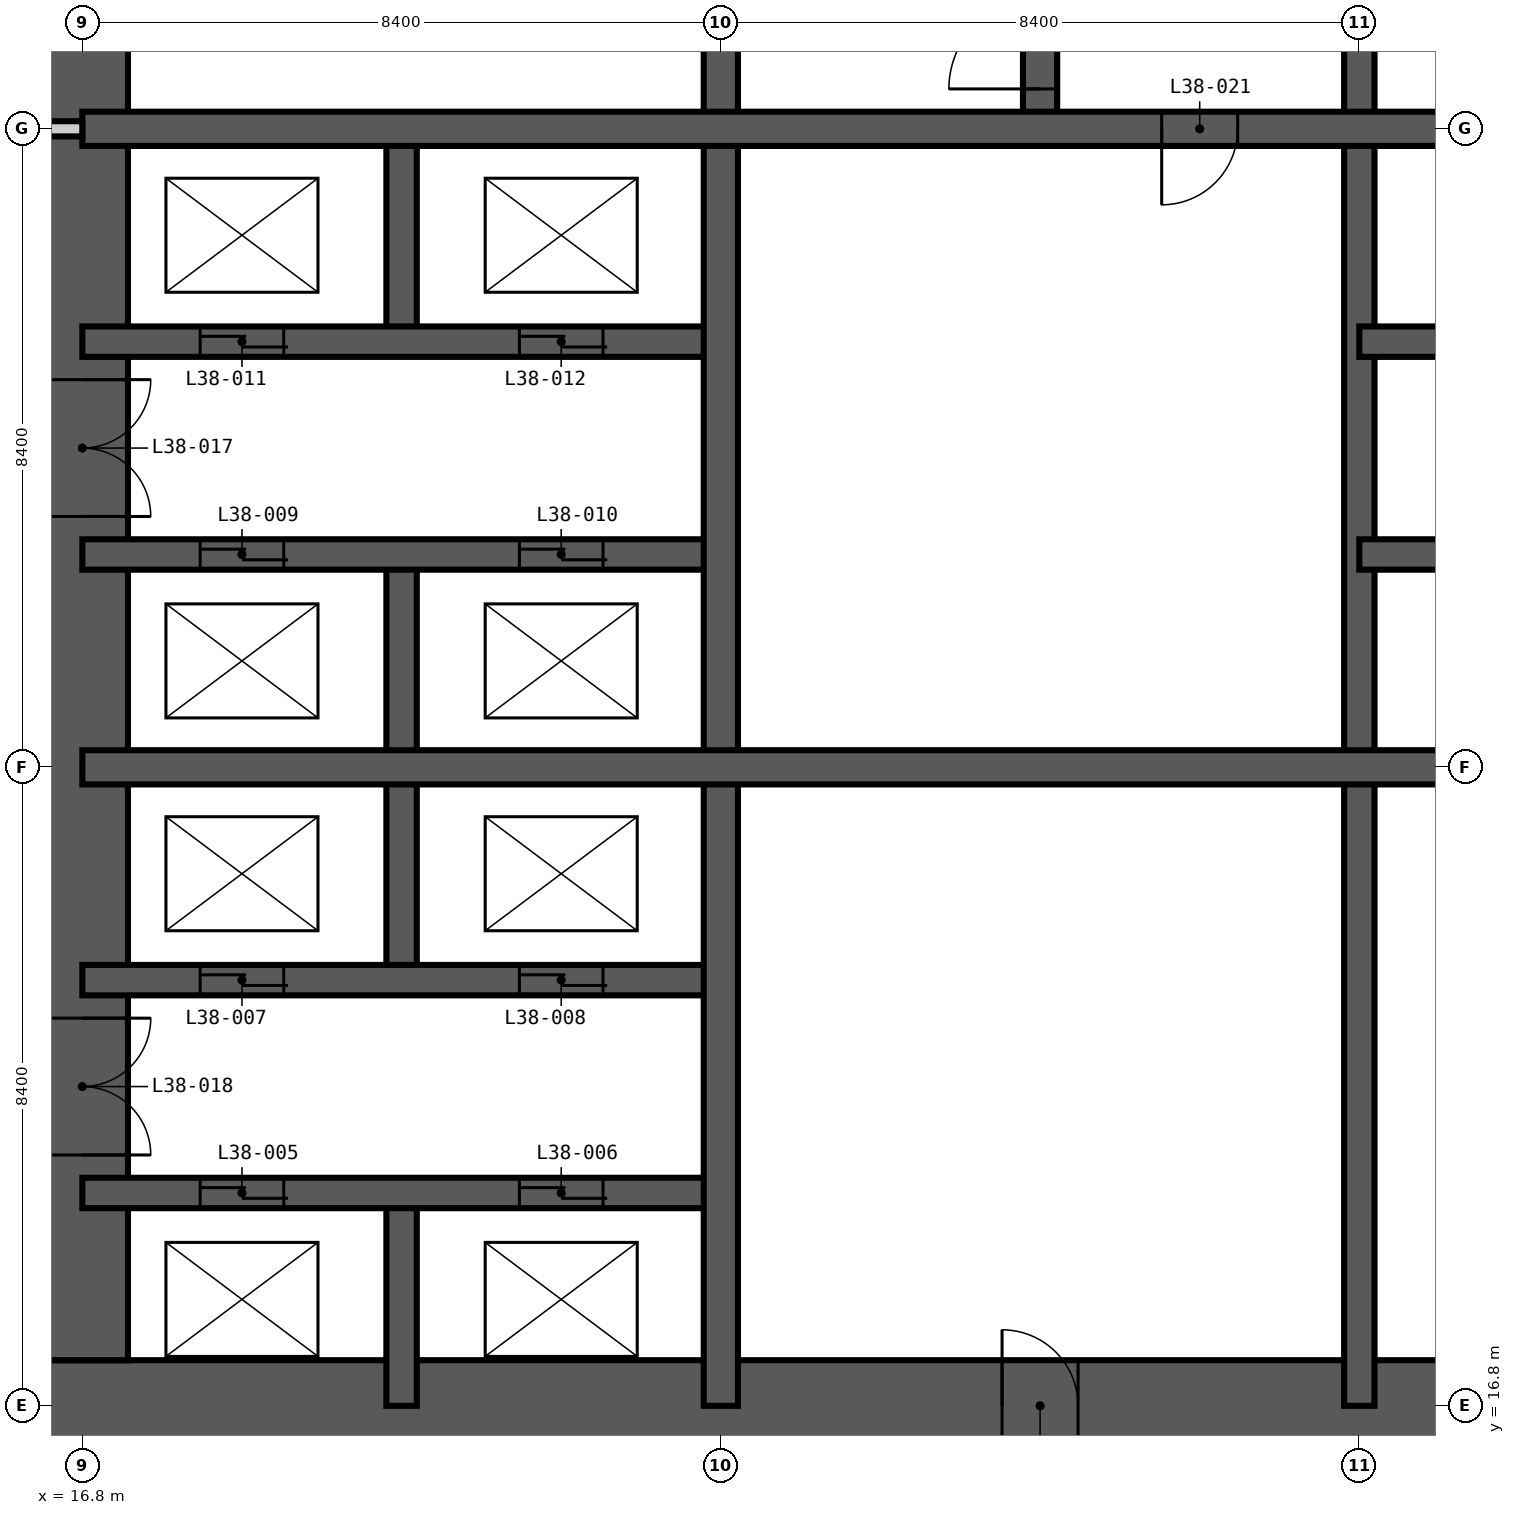
"""IFC4 building model, lengths in metres.
Left out: names, types, materials, properties, quantities, classifications, styles, units other than length and angle.
Written with IfcOpenShell. Run it as: python <this file> out.ifc"""

import sys

from ifc_helpers import new_model, si_unit, direction, frame, frame_2d, origin, place, context, subcontext, project, spatial, rectangle, extrude, element, fill, save


model = new_model("IFC4")
c1 = context("Model", 3, precision=1e-05, world=origin(), true_north=direction((0.0, 1.0)))
c2 = subcontext(c1, "Body", "Model", "MODEL_VIEW")
j1 = project(units=[si_unit("LENGTHUNIT", "METRE"), si_unit("PLANEANGLEUNIT", "RADIAN")], contexts=[c1])
p1 = place(None, origin())
s1 = spatial("IfcSite", under=j1, at=p1, CompositionType="ELEMENT")
p2 = place(p1, origin())
s2 = spatial("IfcBuilding", under=s1, at=p2, CompositionType="ELEMENT")
p3 = place(p2, frame((0.0, 0.0, 147.6)))
s3 = spatial("IfcBuildingStorey", under=s2, at=p3, CompositionType="ELEMENT", Elevation=147.6)
p4 = place(p3, frame((16.2, 16.8, -0.35), z_axis=(0.0, 0.0, 1.0), x_axis=(1.0, 0.0, 0.0)))
e1 = element("IfcWall", 1, at=p4, inside=s3, PredefinedType="SHEAR", context=c2, shape_type="SweptSolid", body=[
    extrude(rectangle(XDim=26.4, YDim=1.2, at=frame_2d((13.2, 0.0))), origin(), (0.0, 0.0, 1.0), 5.95),
])
p5 = place(p4, frame((12.7, 0.0, 0.35)))
e2 = element("IfcOpeningElement", 2, at=p5, cuts=e1, PredefinedType="OPENING", context=c2, shape_type="SweptSolid", body=[
    extrude(rectangle(XDim=1.0, YDim=2.1, at=frame_2d((0.5, 1.05))), frame((0.0, 0.61, 0.0), z_axis=(0.0, -1.0, 0.0), x_axis=(1.0, 0.0, 0.0)), (0.0, 0.0, 1.0), 1.22),
])
p6 = place(p4, frame((19.0, 0.0, 0.35)))
e3 = element("IfcOpeningElement", 3, at=p6, cuts=e1, PredefinedType="OPENING", context=c2, shape_type="SweptSolid", body=[
    extrude(rectangle(XDim=1.0, YDim=2.1, at=frame_2d((0.5, 1.05))), frame((0.0, 0.61, 0.0), z_axis=(0.0, -1.0, 0.0), x_axis=(1.0, 0.0, 0.0)), (0.0, 0.0, 1.0), 1.22),
])
p7 = place(p3, frame((16.8, 41.4, -0.35), z_axis=(0.0, 0.0, 1.0), x_axis=(0.0, -1.0, 0.0)))
e4 = element("IfcWall", 4, at=p7, inside=s3, PredefinedType="SHEAR", context=c2, shape_type="SweptSolid", body=[
    extrude(rectangle(XDim=24.0, YDim=1.2, at=frame_2d((12.0, 0.0))), origin(), (0.0, 0.0, 1.0), 5.95),
])
p8 = place(p7, frame((11.1, 0.0, 0.35)))
e5 = element("IfcOpeningElement", 5, at=p8, cuts=e4, PredefinedType="OPENING", context=c2, shape_type="SweptSolid", body=[
    extrude(rectangle(XDim=1.8, YDim=2.2, at=frame_2d((0.9, 1.1))), frame((0.0, 0.61, 0.0), z_axis=(0.0, -1.0, 0.0), x_axis=(1.0, 0.0, 0.0)), (0.0, 0.0, 1.0), 1.22),
])
p9 = place(p7, frame((19.5, 0.0, 0.35)))
e6 = element("IfcOpeningElement", 6, at=p9, cuts=e4, PredefinedType="OPENING", context=c2, shape_type="SweptSolid", body=[
    extrude(rectangle(XDim=1.8, YDim=2.2, at=frame_2d((0.9, 1.1))), frame((0.0, 0.61, 0.0), z_axis=(0.0, -1.0, 0.0), x_axis=(1.0, 0.0, 0.0)), (0.0, 0.0, 1.0), 1.22),
])
p10 = place(p7, frame((5.2, 0.0, 0.35)))
e7 = element("IfcOpeningElement", 7, at=p10, cuts=e4, PredefinedType="OPENING", context=c2, shape_type="SweptSolid", body=[
    extrude(rectangle(XDim=1.0, YDim=2.1, at=frame_2d((0.5, 1.05))), frame((0.0, 0.61, 0.0), z_axis=(0.0, -1.0, 0.0), x_axis=(1.0, 0.0, 0.0)), (0.0, 0.0, 1.0), 1.22),
])
p11 = place(p3, frame((21.0, 16.8, -0.35), z_axis=(0.0, 0.0, 1.0), x_axis=(0.0, 1.0, 0.0)))
e8 = element("IfcWall", 8, at=p11, inside=s3, PredefinedType="SHEAR", context=c2, shape_type="SweptSolid", body=[
    extrude(rectangle(XDim=2.8, YDim=0.4, at=frame_2d((1.4, 0.0))), origin(), (0.0, 0.0, 1.0), 5.95),
])
p12 = place(p3, frame((21.0, 22.4, -0.35), z_axis=(0.0, 0.0, 1.0), x_axis=(0.0, 1.0, 0.0)))
e9 = element("IfcWall", 9, at=p12, inside=s3, PredefinedType="SHEAR", context=c2, shape_type="SweptSolid", body=[
    extrude(rectangle(XDim=5.6, YDim=0.4, at=frame_2d((2.8, 0.0))), origin(), (0.0, 0.0, 1.0), 5.95),
])
p13 = place(p3, frame((21.0, 30.8, -0.35), z_axis=(0.0, 0.0, 1.0), x_axis=(0.0, 1.0, 0.0)))
e10 = element("IfcWall", 10, at=p13, inside=s3, PredefinedType="SHEAR", context=c2, shape_type="SweptSolid", body=[
    extrude(rectangle(XDim=2.8, YDim=0.4, at=frame_2d((1.4, 0.0))), origin(), (0.0, 0.0, 1.0), 5.95),
])
p14 = place(p3, frame((33.6, 16.8, -0.35), z_axis=(0.0, 0.0, 1.0), x_axis=(0.0, 1.0, 0.0)))
e11 = element("IfcWall", 11, at=p14, inside=s3, PredefinedType="SHEAR", context=c2, shape_type="SweptSolid", body=[
    extrude(rectangle(XDim=25.2, YDim=0.4, at=frame_2d((12.6, 0.0))), origin(), (0.0, 0.0, 1.0), 5.95),
])
p15 = place(p14, frame((22.5, 0.0, 0.35)))
e12 = element("IfcOpeningElement", 12, at=p15, cuts=e11, PredefinedType="OPENING", context=c2, shape_type="SweptSolid", body=[
    extrude(rectangle(XDim=1.2, YDim=2.2, at=frame_2d((0.6, 1.1))), frame((0.0, 0.21, 0.0), z_axis=(0.0, -1.0, 0.0), x_axis=(1.0, 0.0, 0.0)), (0.0, 0.0, 1.0), 0.42),
])
p16 = place(p14, frame((18.3, 0.0, 0.35)))
e13 = element("IfcOpeningElement", 13, at=p16, cuts=e11, PredefinedType="OPENING", context=c2, shape_type="SweptSolid", body=[
    extrude(rectangle(XDim=1.2, YDim=2.2, at=frame_2d((0.6, 1.1))), frame((0.0, 0.21, 0.0), z_axis=(0.0, -1.0, 0.0), x_axis=(1.0, 0.0, 0.0)), (0.0, 0.0, 1.0), 0.42),
])
p17 = place(p3, frame((16.8, 19.6, -0.35), z_axis=(0.0, 0.0, 1.0), x_axis=(1.0, 0.0, 0.0)))
e14 = element("IfcWall", 14, at=p17, inside=s3, PredefinedType="SHEAR", context=c2, shape_type="SweptSolid", body=[
    extrude(rectangle(XDim=8.4, YDim=0.4, at=frame_2d((4.2, 0.0))), origin(), (0.0, 0.0, 1.0), 5.95),
])
p18 = place(p17, frame((1.55, 0.0, 0.35)))
e15 = element("IfcOpeningElement", 15, at=p18, cuts=e14, PredefinedType="OPENING", context=c2, shape_type="SweptSolid", body=[
    extrude(rectangle(XDim=1.1, YDim=2.2, at=frame_2d((0.55, 1.1))), frame((0.0, 0.21, 0.0), z_axis=(0.0, -1.0, 0.0), x_axis=(1.0, 0.0, 0.0)), (0.0, 0.0, 1.0), 0.42),
])
p19 = place(p17, frame((5.75, 0.0, 0.35)))
e16 = element("IfcOpeningElement", 16, at=p19, cuts=e14, PredefinedType="OPENING", context=c2, shape_type="SweptSolid", body=[
    extrude(rectangle(XDim=1.1, YDim=2.2, at=frame_2d((0.55, 1.1))), frame((0.0, 0.21, 0.0), z_axis=(0.0, -1.0, 0.0), x_axis=(1.0, 0.0, 0.0)), (0.0, 0.0, 1.0), 0.42),
])
p20 = place(p3, frame((16.8, 22.4, -0.35), z_axis=(0.0, 0.0, 1.0), x_axis=(1.0, 0.0, 0.0)))
e17 = element("IfcWall", 17, at=p20, inside=s3, PredefinedType="SHEAR", context=c2, shape_type="SweptSolid", body=[
    extrude(rectangle(XDim=8.4, YDim=0.4, at=frame_2d((4.2, 0.0))), origin(), (0.0, 0.0, 1.0), 5.95),
])
p21 = place(p20, frame((1.55, 0.0, 0.35)))
e18 = element("IfcOpeningElement", 18, at=p21, cuts=e17, PredefinedType="OPENING", context=c2, shape_type="SweptSolid", body=[
    extrude(rectangle(XDim=1.1, YDim=2.2, at=frame_2d((0.55, 1.1))), frame((0.0, 0.21, 0.0), z_axis=(0.0, -1.0, 0.0), x_axis=(1.0, 0.0, 0.0)), (0.0, 0.0, 1.0), 0.42),
])
p22 = place(p20, frame((5.75, 0.0, 0.35)))
e19 = element("IfcOpeningElement", 19, at=p22, cuts=e17, PredefinedType="OPENING", context=c2, shape_type="SweptSolid", body=[
    extrude(rectangle(XDim=1.1, YDim=2.2, at=frame_2d((0.55, 1.1))), frame((0.0, 0.21, 0.0), z_axis=(0.0, -1.0, 0.0), x_axis=(1.0, 0.0, 0.0)), (0.0, 0.0, 1.0), 0.42),
])
p23 = place(p3, frame((16.8, 28.0, -0.35), z_axis=(0.0, 0.0, 1.0), x_axis=(1.0, 0.0, 0.0)))
e20 = element("IfcWall", 20, at=p23, inside=s3, PredefinedType="SHEAR", context=c2, shape_type="SweptSolid", body=[
    extrude(rectangle(XDim=8.4, YDim=0.4, at=frame_2d((4.2, 0.0))), origin(), (0.0, 0.0, 1.0), 5.95),
])
p24 = place(p23, frame((1.55, 0.0, 0.35)))
e21 = element("IfcOpeningElement", 21, at=p24, cuts=e20, PredefinedType="OPENING", context=c2, shape_type="SweptSolid", body=[
    extrude(rectangle(XDim=1.1, YDim=2.2, at=frame_2d((0.55, 1.1))), frame((0.0, 0.21, 0.0), z_axis=(0.0, -1.0, 0.0), x_axis=(1.0, 0.0, 0.0)), (0.0, 0.0, 1.0), 0.42),
])
p25 = place(p23, frame((5.75, 0.0, 0.35)))
e22 = element("IfcOpeningElement", 22, at=p25, cuts=e20, PredefinedType="OPENING", context=c2, shape_type="SweptSolid", body=[
    extrude(rectangle(XDim=1.1, YDim=2.2, at=frame_2d((0.55, 1.1))), frame((0.0, 0.21, 0.0), z_axis=(0.0, -1.0, 0.0), x_axis=(1.0, 0.0, 0.0)), (0.0, 0.0, 1.0), 0.42),
])
p26 = place(p3, frame((33.6, 28.0, -0.35), z_axis=(0.0, 0.0, 1.0), x_axis=(1.0, 0.0, 0.0)))
e23 = element("IfcWall", 23, at=p26, inside=s3, PredefinedType="SHEAR", context=c2, shape_type="SweptSolid", body=[
    extrude(rectangle(XDim=8.4, YDim=0.4, at=frame_2d((4.2, 0.0))), origin(), (0.0, 0.0, 1.0), 5.95),
])
p27 = place(p26, frame((1.55, 0.0, 0.35)))
e24 = element("IfcOpeningElement", 24, at=p27, cuts=e23, PredefinedType="OPENING", context=c2, shape_type="SweptSolid", body=[
    extrude(rectangle(XDim=1.1, YDim=2.2, at=frame_2d((0.55, 1.1))), frame((0.0, 0.21, 0.0), z_axis=(0.0, -1.0, 0.0), x_axis=(1.0, 0.0, 0.0)), (0.0, 0.0, 1.0), 0.42),
])
p28 = place(p26, frame((5.75, 0.0, 0.35)))
e25 = element("IfcOpeningElement", 25, at=p28, cuts=e23, PredefinedType="OPENING", context=c2, shape_type="SweptSolid", body=[
    extrude(rectangle(XDim=1.1, YDim=2.2, at=frame_2d((0.55, 1.1))), frame((0.0, 0.21, 0.0), z_axis=(0.0, -1.0, 0.0), x_axis=(1.0, 0.0, 0.0)), (0.0, 0.0, 1.0), 0.42),
])
p29 = place(p3, frame((16.8, 30.8, -0.35), z_axis=(0.0, 0.0, 1.0), x_axis=(1.0, 0.0, 0.0)))
e26 = element("IfcWall", 26, at=p29, inside=s3, PredefinedType="SHEAR", context=c2, shape_type="SweptSolid", body=[
    extrude(rectangle(XDim=8.4, YDim=0.4, at=frame_2d((4.2, 0.0))), origin(), (0.0, 0.0, 1.0), 5.95),
])
p30 = place(p29, frame((1.55, 0.0, 0.35)))
e27 = element("IfcOpeningElement", 27, at=p30, cuts=e26, PredefinedType="OPENING", context=c2, shape_type="SweptSolid", body=[
    extrude(rectangle(XDim=1.1, YDim=2.2, at=frame_2d((0.55, 1.1))), frame((0.0, 0.21, 0.0), z_axis=(0.0, -1.0, 0.0), x_axis=(1.0, 0.0, 0.0)), (0.0, 0.0, 1.0), 0.42),
])
p31 = place(p29, frame((5.75, 0.0, 0.35)))
e28 = element("IfcOpeningElement", 28, at=p31, cuts=e26, PredefinedType="OPENING", context=c2, shape_type="SweptSolid", body=[
    extrude(rectangle(XDim=1.1, YDim=2.2, at=frame_2d((0.55, 1.1))), frame((0.0, 0.21, 0.0), z_axis=(0.0, -1.0, 0.0), x_axis=(1.0, 0.0, 0.0)), (0.0, 0.0, 1.0), 0.42),
])
p32 = place(p3, frame((33.6, 30.8, -0.35), z_axis=(0.0, 0.0, 1.0), x_axis=(1.0, 0.0, 0.0)))
e29 = element("IfcWall", 29, at=p32, inside=s3, PredefinedType="SHEAR", context=c2, shape_type="SweptSolid", body=[
    extrude(rectangle(XDim=8.4, YDim=0.4, at=frame_2d((4.2, 0.0))), origin(), (0.0, 0.0, 1.0), 5.95),
])
p33 = place(p32, frame((1.55, 0.0, 0.35)))
e30 = element("IfcOpeningElement", 30, at=p33, cuts=e29, PredefinedType="OPENING", context=c2, shape_type="SweptSolid", body=[
    extrude(rectangle(XDim=1.1, YDim=2.2, at=frame_2d((0.55, 1.1))), frame((0.0, 0.21, 0.0), z_axis=(0.0, -1.0, 0.0), x_axis=(1.0, 0.0, 0.0)), (0.0, 0.0, 1.0), 0.42),
])
p34 = place(p32, frame((5.75, 0.0, 0.35)))
e31 = element("IfcOpeningElement", 31, at=p34, cuts=e29, PredefinedType="OPENING", context=c2, shape_type="SweptSolid", body=[
    extrude(rectangle(XDim=1.1, YDim=2.2, at=frame_2d((0.55, 1.1))), frame((0.0, 0.21, 0.0), z_axis=(0.0, -1.0, 0.0), x_axis=(1.0, 0.0, 0.0)), (0.0, 0.0, 1.0), 0.42),
])
p35 = place(p3, frame((25.2, 16.8, -0.35), z_axis=(0.0, 0.0, 1.0), x_axis=(0.0, 1.0, 0.0)))
e32 = element("IfcWall", 32, at=p35, inside=s3, PredefinedType="SHEAR", context=c2, shape_type="SweptSolid", body=[
    extrude(rectangle(XDim=25.2, YDim=0.45, at=frame_2d((12.6, 0.0))), origin(), (0.0, 0.0, 1.0), 5.95),
])
p36 = place(p3, frame((29.4, 33.6, -0.35), z_axis=(0.0, 0.0, 1.0), x_axis=(0.0, 1.0, 0.0)))
e33 = element("IfcWall", 33, at=p36, inside=s3, PredefinedType="SHEAR", context=c2, shape_type="SweptSolid", body=[
    extrude(rectangle(XDim=8.4, YDim=0.45, at=frame_2d((4.2, 0.0))), origin(), (0.0, 0.0, 1.0), 5.95),
])
p37 = place(p36, frame((0.525, 0.0, 0.35)))
e34 = element("IfcOpeningElement", 34, at=p37, cuts=e33, PredefinedType="OPENING", context=c2, shape_type="SweptSolid", body=[
    extrude(rectangle(XDim=1.2, YDim=2.2, at=frame_2d((0.6, 1.1))), frame((0.0, 0.235, 0.0), z_axis=(0.0, -1.0, 0.0), x_axis=(1.0, 0.0, 0.0)), (0.0, 0.0, 1.0), 0.47),
])
p38 = place(p3, frame((16.8, 25.2, -0.35), z_axis=(0.0, 0.0, 1.0), x_axis=(1.0, 0.0, 0.0)))
e35 = element("IfcWall", 35, at=p38, inside=s3, PredefinedType="SHEAR", context=c2, shape_type="SweptSolid", body=[
    extrude(rectangle(XDim=25.2, YDim=0.45, at=frame_2d((12.6, 0.0))), origin(), (0.0, 0.0, 1.0), 5.95),
])
p39 = place(p3, frame((16.8, 33.6, -0.35), z_axis=(0.0, 0.0, 1.0), x_axis=(1.0, 0.0, 0.0)))
e36 = element("IfcWall", 36, at=p39, inside=s3, PredefinedType="SHEAR", context=c2, shape_type="SweptSolid", body=[
    extrude(rectangle(XDim=25.2, YDim=0.45, at=frame_2d((12.6, 0.0))), origin(), (0.0, 0.0, 1.0), 5.95),
])
p40 = place(p39, frame((14.2, 0.0, 0.35)))
e37 = element("IfcOpeningElement", 37, at=p40, cuts=e36, PredefinedType="OPENING", context=c2, shape_type="SweptSolid", body=[
    extrude(rectangle(XDim=1.0, YDim=2.1, at=frame_2d((0.5, 1.05))), frame((0.0, 0.235, 0.0), z_axis=(0.0, -1.0, 0.0), x_axis=(1.0, 0.0, 0.0)), (0.0, 0.0, 1.0), 0.47),
])
p41 = place(p3, frame((12.6, 33.6, 0.0), z_axis=(0.0, 0.0, 1.0), x_axis=(1.0, 0.0, 0.0)))
e38 = element("IfcWall", 38, at=p41, inside=s3, PredefinedType="PARTITIONING", context=c2, shape_type="SweptSolid", body=[
    extrude(rectangle(XDim=4.2, YDim=0.2, at=frame_2d((2.1, 0.0))), origin(), (0.0, 0.0, 1.0), 5.6),
])
p42 = place(p37, origin())
e39 = element("IfcDoor", 39, at=p42, inside=s3, OperationType="SINGLE_SWING_LEFT", PredefinedType="DOOR", context=c2, shape_type="SweptSolid", body=[
    extrude(rectangle(XDim=1.2, YDim=2.2, at=frame_2d((0.6, 1.1))), frame((0.0, 0.025, 0.0), z_axis=(0.0, -1.0, 0.0), x_axis=(1.0, 0.0, 0.0)), (0.0, 0.0, 1.0), 0.05),
])
fill(e34, e39)
p43 = place(p18, origin())
e40 = element("IfcDoor", 40, at=p43, inside=s3, OperationType="DOUBLE_DOOR_SLIDING", PredefinedType="DOOR", context=c2, shape_type="SweptSolid", body=[
    extrude(rectangle(XDim=1.1, YDim=2.2, at=frame_2d((0.55, 1.1))), frame((0.0, 0.025, 0.0), z_axis=(0.0, -1.0, 0.0), x_axis=(1.0, 0.0, 0.0)), (0.0, 0.0, 1.0), 0.05),
])
fill(e15, e40)
p44 = place(p19, origin())
e41 = element("IfcDoor", 41, at=p44, inside=s3, OperationType="DOUBLE_DOOR_SLIDING", PredefinedType="DOOR", context=c2, shape_type="SweptSolid", body=[
    extrude(rectangle(XDim=1.1, YDim=2.2, at=frame_2d((0.55, 1.1))), frame((0.0, 0.025, 0.0), z_axis=(0.0, -1.0, 0.0), x_axis=(1.0, 0.0, 0.0)), (0.0, 0.0, 1.0), 0.05),
])
fill(e16, e41)
p45 = place(p21, origin())
e42 = element("IfcDoor", 42, at=p45, inside=s3, OperationType="DOUBLE_DOOR_SLIDING", PredefinedType="DOOR", context=c2, shape_type="SweptSolid", body=[
    extrude(rectangle(XDim=1.1, YDim=2.2, at=frame_2d((0.55, 1.1))), frame((0.0, 0.025, 0.0), z_axis=(0.0, -1.0, 0.0), x_axis=(1.0, 0.0, 0.0)), (0.0, 0.0, 1.0), 0.05),
])
fill(e18, e42)
p46 = place(p22, origin())
e43 = element("IfcDoor", 43, at=p46, inside=s3, OperationType="DOUBLE_DOOR_SLIDING", PredefinedType="DOOR", context=c2, shape_type="SweptSolid", body=[
    extrude(rectangle(XDim=1.1, YDim=2.2, at=frame_2d((0.55, 1.1))), frame((0.0, 0.025, 0.0), z_axis=(0.0, -1.0, 0.0), x_axis=(1.0, 0.0, 0.0)), (0.0, 0.0, 1.0), 0.05),
])
fill(e19, e43)
p47 = place(p24, origin())
e44 = element("IfcDoor", 44, at=p47, inside=s3, OperationType="DOUBLE_DOOR_SLIDING", PredefinedType="DOOR", context=c2, shape_type="SweptSolid", body=[
    extrude(rectangle(XDim=1.1, YDim=2.2, at=frame_2d((0.55, 1.1))), frame((0.0, 0.025, 0.0), z_axis=(0.0, -1.0, 0.0), x_axis=(1.0, 0.0, 0.0)), (0.0, 0.0, 1.0), 0.05),
])
fill(e21, e44)
p48 = place(p25, origin())
e45 = element("IfcDoor", 45, at=p48, inside=s3, OperationType="DOUBLE_DOOR_SLIDING", PredefinedType="DOOR", context=c2, shape_type="SweptSolid", body=[
    extrude(rectangle(XDim=1.1, YDim=2.2, at=frame_2d((0.55, 1.1))), frame((0.0, 0.025, 0.0), z_axis=(0.0, -1.0, 0.0), x_axis=(1.0, 0.0, 0.0)), (0.0, 0.0, 1.0), 0.05),
])
fill(e22, e45)
p49 = place(p30, origin())
e46 = element("IfcDoor", 46, at=p49, inside=s3, OperationType="DOUBLE_DOOR_SLIDING", PredefinedType="DOOR", context=c2, shape_type="SweptSolid", body=[
    extrude(rectangle(XDim=1.1, YDim=2.2, at=frame_2d((0.55, 1.1))), frame((0.0, 0.025, 0.0), z_axis=(0.0, -1.0, 0.0), x_axis=(1.0, 0.0, 0.0)), (0.0, 0.0, 1.0), 0.05),
])
fill(e27, e46)
p50 = place(p31, origin())
e47 = element("IfcDoor", 47, at=p50, inside=s3, OperationType="DOUBLE_DOOR_SLIDING", PredefinedType="DOOR", context=c2, shape_type="SweptSolid", body=[
    extrude(rectangle(XDim=1.1, YDim=2.2, at=frame_2d((0.55, 1.1))), frame((0.0, 0.025, 0.0), z_axis=(0.0, -1.0, 0.0), x_axis=(1.0, 0.0, 0.0)), (0.0, 0.0, 1.0), 0.05),
])
fill(e28, e47)
p51 = place(p8, origin())
e48 = element("IfcDoor", 48, at=p51, inside=s3, OperationType="DOUBLE_DOOR_DOUBLE_SWING", PredefinedType="DOOR", context=c2, shape_type="SweptSolid", body=[
    extrude(rectangle(XDim=1.8, YDim=2.2, at=frame_2d((0.9, 1.1))), frame((0.0, 0.025, 0.0), z_axis=(0.0, -1.0, 0.0), x_axis=(1.0, 0.0, 0.0)), (0.0, 0.0, 1.0), 0.05),
])
fill(e5, e48)
p52 = place(p9, origin())
e49 = element("IfcDoor", 49, at=p52, inside=s3, OperationType="DOUBLE_DOOR_DOUBLE_SWING", PredefinedType="DOOR", context=c2, shape_type="SweptSolid", body=[
    extrude(rectangle(XDim=1.8, YDim=2.2, at=frame_2d((0.9, 1.1))), frame((0.0, 0.025, 0.0), z_axis=(0.0, -1.0, 0.0), x_axis=(1.0, 0.0, 0.0)), (0.0, 0.0, 1.0), 0.05),
])
fill(e6, e49)
p53 = place(p40, frame((1.0, 0.0, 0.0), z_axis=(0.0, 0.0, 1.0), x_axis=(-1.0, 0.0, 0.0)))
e50 = element("IfcDoor", 50, at=p53, inside=s3, OperationType="SINGLE_SWING_RIGHT", PredefinedType="DOOR", context=c2, shape_type="SweptSolid", body=[
    extrude(rectangle(XDim=1.0, YDim=2.1, at=frame_2d((0.5, 1.05))), frame((0.0, 0.025, 0.0), z_axis=(0.0, -1.0, 0.0), x_axis=(1.0, 0.0, 0.0)), (0.0, 0.0, 1.0), 0.05),
])
fill(e37, e50)
p54 = place(p5, origin())
e51 = element("IfcDoor", 51, at=p54, inside=s3, OperationType="SINGLE_SWING_LEFT", PredefinedType="DOOR", context=c2, shape_type="SweptSolid", body=[
    extrude(rectangle(XDim=1.0, YDim=2.1, at=frame_2d((0.5, 1.05))), frame((0.0, 0.025, 0.0), z_axis=(0.0, -1.0, 0.0), x_axis=(1.0, 0.0, 0.0)), (0.0, 0.0, 1.0), 0.05),
])
fill(e2, e51)
save(model, sys.argv[1])
